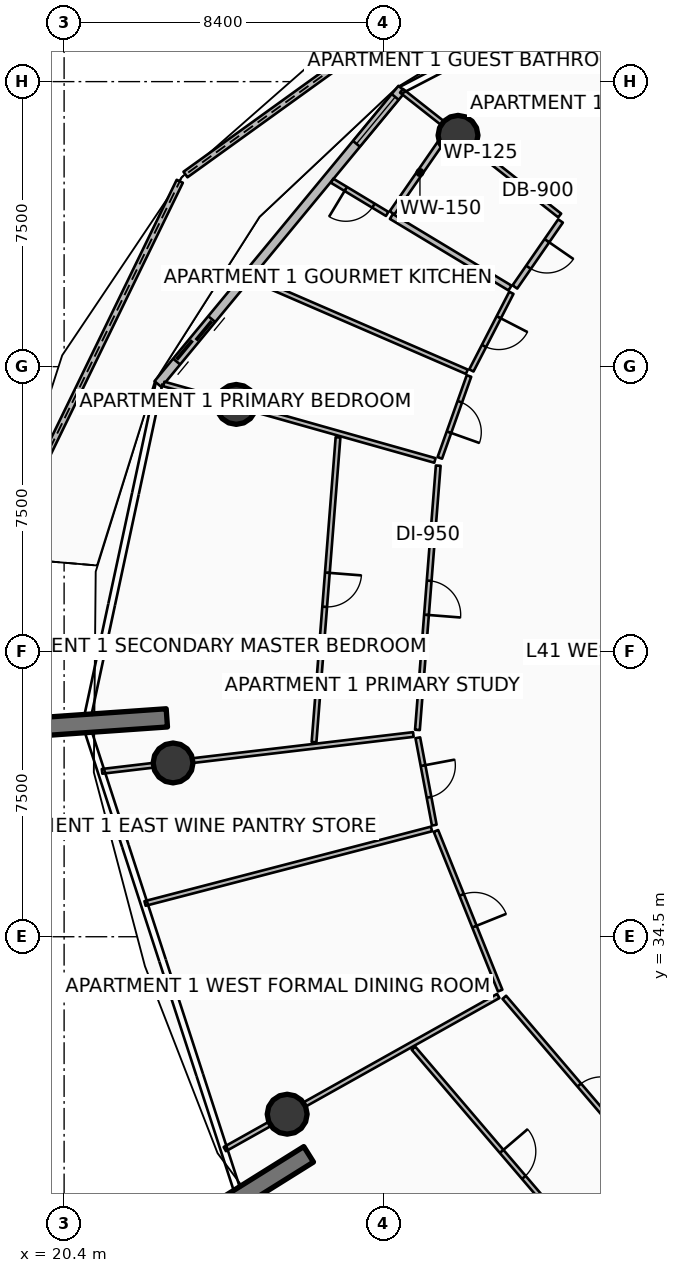
"""IFC4 building model, lengths in metres.
Left out: names, types, materials, properties, quantities, classifications, styles, units other than length and angle.
Written with IfcOpenShell. Run it as: python <this file> out.ifc"""

import sys

from ifc_helpers import new_model, si_unit, direction, frame, frame_2d, origin, origin_2d, place, context, subcontext, project, spatial, polyline, rectangle, circle, outline, extrude, element, fill, save


model = new_model("IFC4")
c1 = context("Model", 3, precision=1e-05, world=origin(), true_north=direction((0.0, 1.0)))
c2 = subcontext(c1, "Body", "Model", "MODEL_VIEW")
j1 = project(units=[si_unit("LENGTHUNIT", "METRE"), si_unit("PLANEANGLEUNIT", "RADIAN")], contexts=[c1])
p1 = place(None, origin())
s1 = spatial("IfcSite", under=j1, at=p1, CompositionType="ELEMENT")
p2 = place(p1, origin())
s2 = spatial("IfcBuilding", under=s1, at=p2, CompositionType="ELEMENT")
p3 = place(p2, frame((0.0, 0.0, 165.3)))
s3 = spatial("IfcBuildingStorey", under=s2, at=p3, CompositionType="ELEMENT", Elevation=165.3)
for number, where, z_axis, x_axis in (
    (1, (23.103, 40.259, 0.0), (0.0, 0.0, 1.0), (-0.998, -0.07, 0.0)),
    (2, (26.835, 28.774, 0.0), (0.0, 0.0, 1.0), (-0.848, -0.53, 0.0)),
):
    element("IfcWall", number, at=place(p3, frame(where, z_axis=z_axis, x_axis=x_axis)), inside=s3, PredefinedType="SOLIDWALL", context=c2, shape_type="SweptSolid", body=[
        extrude(rectangle(XDim=3.5, YDim=0.48, at=frame_2d((1.75, 0.0))), origin(), (0.0, 0.0, 1.0), 3.75),
    ])
for number, where, z_axis, x_axis in (
    (3, (30.766, 55.586, 0.0), (0.0, 0.0, 1.0), (1.0, 0.0, 0.0)),
    (4, (24.93, 48.506, 0.0), (0.0, 0.0, 1.0), (1.0, 0.0, 0.0)),
    (5, (23.267, 39.073, 0.0), (0.0, 0.0, 1.0), (1.0, 0.0, 0.0)),
    (6, (26.27, 29.831, 0.0), (0.0, 0.0, 1.0), (1.0, 0.0, 0.0)),
):
    element("IfcColumn", number, at=place(p3, frame(where, z_axis=z_axis, x_axis=x_axis)), inside=s3, PredefinedType="COLUMN", context=c2, shape_type="SweptSolid", body=[
        extrude(circle(Radius=0.525, at=origin_2d()), origin(), (0.0, 0.0, 1.0), 3.5),
    ])
p4 = place(p3, frame((31.942, 60.57, 0.0), z_axis=(0.0, 0.0, 1.0), x_axis=(-0.811363748486, -0.584541587608, 0.0)))
e7 = element("IfcWall", 7, at=p4, inside=s3, PredefinedType="PARAPET", context=c2, shape_type="SweptSolid", body=[
    extrude(outline(polyline([(0.0, 0.0), (10.29, 0.0), (10.29, 1.632), (5.145, 1.418), (0.0, 1.233), (0.0, 0.0)])), frame((0.0, 0.09, 0.0), z_axis=(0.0, -1.0, 0.0), x_axis=(1.0, 0.0, 0.0)), (0.0, 0.0, 1.0), 0.18),
])
p5 = place(p3, frame((23.444, 54.377, 0.0), z_axis=(0.0, 0.0, 1.0), x_axis=(-0.437208925246, -0.899359970026, 0.0)))
e8 = element("IfcWall", 8, at=p5, inside=s3, PredefinedType="PARAPET", context=c2, shape_type="SweptSolid", body=[
    extrude(outline(polyline([(0.0, 0.0), (10.992, 0.0), (10.992, 1.86), (5.496, 1.798), (0.0, 1.632), (0.0, 0.0)])), frame((0.0, 0.09, 0.0), z_axis=(0.0, -1.0, 0.0), x_axis=(1.0, 0.0, 0.0)), (0.0, 0.0, 1.0), 0.18),
])
p6 = place(p3, frame((29.291, 56.813, 0.0), z_axis=(0.0, 0.0, 1.0), x_axis=(-0.636771922292, -0.77105221547, 0.0)))
e9 = element("IfcWall", 9, at=p6, inside=s3, PredefinedType="SOLIDWALL", context=c2, shape_type="SweptSolid", body=[
    extrude(rectangle(XDim=10.082, YDim=0.24, at=frame_2d((5.041, 0.0))), origin(), (0.0, 0.0, 1.0), 2.45),
])
p7 = place(p6, frame((7.862, 0.0, 0.0)))
e10 = element("IfcOpeningElement", 10, at=p7, cuts=e9, PredefinedType="OPENING", context=c2, shape_type="SweptSolid", body=[
    extrude(rectangle(XDim=1.45, YDim=2.15, at=frame_2d((0.725, 1.075))), frame((0.0, 0.13, 0.0), z_axis=(0.0, -1.0, 0.0), x_axis=(1.0, 0.0, 0.0)), (0.0, 0.0, 1.0), 0.26),
])
p8 = place(p6, frame((0.28, 0.0, 0.65)))
e11 = element("IfcOpeningElement", 11, at=p8, cuts=e9, PredefinedType="OPENING", context=c2, shape_type="SweptSolid", body=[
    extrude(rectangle(XDim=1.6, YDim=1.5, at=frame_2d((0.8, 0.75))), frame((0.0, 0.13, 0.0), z_axis=(0.0, -1.0, 0.0), x_axis=(1.0, 0.0, 0.0)), (0.0, 0.0, 1.0), 0.26),
])
p9 = place(p3, frame((33.441, 53.477, 0.0), z_axis=(0.0, 0.0, 1.0), x_axis=(-0.785319981095, 0.619090080112, 0.0)))
e12 = element("IfcWall", 12, at=p9, inside=s3, PredefinedType="PARTITIONING", context=c2, shape_type="SweptSolid", body=[
    extrude(rectangle(XDim=5.301, YDim=0.125, at=frame_2d((2.65, 0.0))), origin(), (0.0, 0.0, 1.0), 2.94),
])
p10 = place(p3, frame((33.463, 53.333, 0.0), z_axis=(0.0, 0.0, 1.0), x_axis=(-0.568843105688, -0.822446059697, 0.0)))
e13 = element("IfcWall", 13, at=p10, inside=s3, PredefinedType="PARTITIONING", context=c2, shape_type="SweptSolid", body=[
    extrude(rectangle(XDim=2.111, YDim=0.15, at=frame_2d((1.056, 0.0))), origin(), (0.0, 0.0, 1.0), 2.94),
])
p11 = place(p10, frame((0.631, 0.0, 0.0)))
e14 = element("IfcOpeningElement", 14, at=p11, cuts=e13, PredefinedType="OPENING", context=c2, shape_type="SweptSolid", body=[
    extrude(rectangle(XDim=0.85, YDim=2.06, at=frame_2d((0.425, 1.03))), frame((0.0, 0.085, 0.0), z_axis=(0.0, -1.0, 0.0), x_axis=(1.0, 0.0, 0.0)), (0.0, 0.0, 1.0), 0.17),
])
p12 = place(p3, frame((30.498, 55.67, 0.0), z_axis=(0.0, 0.0, 1.0), x_axis=(-0.56886579211, -0.822430368218, 0.0)))
e15 = element("IfcWall", 15, at=p12, inside=s3, PredefinedType="PARTITIONING", context=c2, shape_type="SweptSolid", body=[
    extrude(rectangle(XDim=2.582, YDim=0.15, at=frame_2d((1.291, 0.0))), origin(), (0.0, 0.0, 1.0), 2.94),
])
p13 = place(p3, frame((32.133, 51.57, 0.0), z_axis=(0.0, 0.0, 1.0), x_axis=(-0.856320461768, 0.516444834186, 0.0)))
e16 = element("IfcWall", 16, at=p13, inside=s3, PredefinedType="PARTITIONING", context=c2, shape_type="SweptSolid", body=[
    extrude(rectangle(XDim=3.645, YDim=0.15, at=frame_2d((1.822, 0.0))), origin(), (0.0, 0.0, 1.0), 2.94),
])
p14 = place(p3, frame((28.901, 53.519, 0.0), z_axis=(0.0, 0.0, 1.0), x_axis=(-0.856306503803, 0.516467977269, 0.0)))
e17 = element("IfcWall", 17, at=p14, inside=s3, PredefinedType="PARTITIONING", context=c2, shape_type="SweptSolid", body=[
    extrude(rectangle(XDim=1.692, YDim=0.125, at=frame_2d((0.846, 0.0))), origin(), (0.0, 0.0, 1.0), 2.94),
])
p15 = place(p14, frame((0.421, 0.0, 0.0)))
e18 = element("IfcOpeningElement", 18, at=p15, cuts=e17, PredefinedType="OPENING", context=c2, shape_type="SweptSolid", body=[
    extrude(rectangle(XDim=0.85, YDim=2.06, at=frame_2d((0.425, 1.03))), frame((0.0, 0.073, 0.0), z_axis=(0.0, -1.0, 0.0), x_axis=(1.0, 0.0, 0.0)), (0.0, 0.0, 1.0), 0.145),
])
p16 = place(p3, frame((30.998, 49.365, 0.0), z_axis=(0.0, 0.0, 1.0), x_axis=(-0.917591640713, 0.397524314845, 0.0)))
e19 = element("IfcWall", 19, at=p16, inside=s3, PredefinedType="PARTITIONING", context=c2, shape_type="SweptSolid", body=[
    extrude(rectangle(XDim=6.182, YDim=0.125, at=frame_2d((3.091, 0.0))), origin(), (0.0, 0.0, 1.0), 2.94),
])
p17 = place(p3, frame((32.169, 51.443, 0.0), z_axis=(0.0, 0.0, 1.0), x_axis=(-0.458020211203, -0.888941778819, 0.0)))
e20 = element("IfcWall", 20, at=p17, inside=s3, PredefinedType="PARTITIONING", context=c2, shape_type="SweptSolid", body=[
    extrude(rectangle(XDim=2.297, YDim=0.125, at=frame_2d((1.149, 0.0))), origin(), (0.0, 0.0, 1.0), 2.94),
])
p18 = place(p17, frame((0.724, 0.0, 0.0)))
e21 = element("IfcOpeningElement", 21, at=p18, cuts=e20, PredefinedType="OPENING", context=c2, shape_type="SweptSolid", body=[
    extrude(rectangle(XDim=0.85, YDim=2.06, at=frame_2d((0.425, 1.03))), frame((0.0, 0.073, 0.0), z_axis=(0.0, -1.0, 0.0), x_axis=(1.0, 0.0, 0.0)), (0.0, 0.0, 1.0), 0.145),
])
p19 = place(p3, frame((31.054, 49.254, 0.0), z_axis=(0.0, 0.0, 1.0), x_axis=(-0.335247594753, -0.942130060136, 0.0)))
e22 = element("IfcWall", 22, at=p19, inside=s3, PredefinedType="PARTITIONING", context=c2, shape_type="SweptSolid", body=[
    extrude(rectangle(XDim=2.287, YDim=0.125, at=frame_2d((1.144, 0.0))), origin(), (0.0, 0.0, 1.0), 2.94),
])
p20 = place(p19, frame((0.719, 0.0, 0.0)))
e23 = element("IfcOpeningElement", 23, at=p20, cuts=e22, PredefinedType="OPENING", context=c2, shape_type="SweptSolid", body=[
    extrude(rectangle(XDim=0.85, YDim=2.06, at=frame_2d((0.425, 1.03))), frame((0.0, 0.073, 0.0), z_axis=(0.0, -1.0, 0.0), x_axis=(1.0, 0.0, 0.0)), (0.0, 0.0, 1.0), 0.145),
])
p21 = place(p3, frame((30.157, 47.032, 0.0), z_axis=(0.0, 0.0, 1.0), x_axis=(-0.962456736489, 0.271435131084, 0.0)))
e24 = element("IfcWall", 24, at=p21, inside=s3, PredefinedType="PARTITIONING", context=c2, shape_type="SweptSolid", body=[
    extrude(rectangle(XDim=7.412, YDim=0.125, at=frame_2d((3.706, 0.0))), origin(), (0.0, 0.0, 1.0), 2.94),
])
p22 = place(p3, frame((30.245, 46.896, 0.0), z_axis=(0.0, 0.0, 1.0), x_axis=(-0.078444324085, -0.996918496177, 0.0)))
e25 = element("IfcWall", 25, at=p22, inside=s3, PredefinedType="PARTITIONING", context=c2, shape_type="SweptSolid", body=[
    extrude(rectangle(XDim=6.975, YDim=0.125, at=frame_2d((3.487, 0.0))), origin(), (0.0, 0.0, 1.0), 2.94),
])
p23 = place(p22, frame((3.037, 0.0, 0.0)))
e26 = element("IfcOpeningElement", 26, at=p23, cuts=e25, PredefinedType="OPENING", context=c2, shape_type="SweptSolid", body=[
    extrude(rectangle(XDim=0.9, YDim=2.08, at=frame_2d((0.45, 1.04))), frame((0.0, 0.073, 0.0), z_axis=(0.0, -1.0, 0.0), x_axis=(1.0, 0.0, 0.0)), (0.0, 0.0, 1.0), 0.145),
])
p24 = place(p3, frame((27.608, 47.639, 0.0), z_axis=(0.0, 0.0, 1.0), x_axis=(-0.078490541144, -0.996914858426, 0.0)))
e27 = element("IfcWall", 27, at=p24, inside=s3, PredefinedType="PARTITIONING", context=c2, shape_type="SweptSolid", body=[
    extrude(rectangle(XDim=8.044, YDim=0.125, at=frame_2d((4.022, 0.0))), origin(), (0.0, 0.0, 1.0), 2.94),
])
p25 = place(p24, frame((3.572, 0.0, 0.0)))
e28 = element("IfcOpeningElement", 28, at=p25, cuts=e27, PredefinedType="OPENING", context=c2, shape_type="SweptSolid", body=[
    extrude(rectangle(XDim=0.9, YDim=2.08, at=frame_2d((0.45, 1.04))), frame((0.0, 0.073, 0.0), z_axis=(0.0, -1.0, 0.0), x_axis=(1.0, 0.0, 0.0)), (0.0, 0.0, 1.0), 0.145),
])
p26 = place(p3, frame((29.59, 39.821, 0.0), z_axis=(0.0, 0.0, 1.0), x_axis=(-0.993070354128, -0.117521367213, 0.0)))
e29 = element("IfcWall", 29, at=p26, inside=s3, PredefinedType="PARTITIONING", context=c2, shape_type="SweptSolid", body=[
    extrude(rectangle(XDim=8.247, YDim=0.125, at=frame_2d((4.124, 0.0))), origin(), (0.0, 0.0, 1.0), 2.94),
])
p27 = place(p3, frame((30.068, 37.336, 0.0), z_axis=(0.0, 0.0, 1.0), x_axis=(-0.967797769308, -0.251728976723, 0.0)))
e30 = element("IfcWall", 30, at=p27, inside=s3, PredefinedType="PARTITIONING", context=c2, shape_type="SweptSolid", body=[
    extrude(rectangle(XDim=7.789, YDim=0.125, at=frame_2d((3.895, 0.0))), origin(), (0.0, 0.0, 1.0), 2.94),
])
p28 = place(p3, frame((29.707, 39.734, 0.0), z_axis=(0.0, 0.0, 1.0), x_axis=(0.185057746292, -0.9827276482, 0.0)))
e31 = element("IfcWall", 31, at=p28, inside=s3, PredefinedType="PARTITIONING", context=c2, shape_type="SweptSolid", body=[
    extrude(rectangle(XDim=2.338, YDim=0.125, at=frame_2d((1.169, 0.0))), origin(), (0.0, 0.0, 1.0), 2.94),
])
p29 = place(p28, frame((0.744, 0.0, 0.0)))
e32 = element("IfcOpeningElement", 32, at=p29, cuts=e31, PredefinedType="OPENING", context=c2, shape_type="SweptSolid", body=[
    extrude(rectangle(XDim=0.85, YDim=2.06, at=frame_2d((0.425, 1.03))), frame((0.0, 0.073, 0.0), z_axis=(0.0, -1.0, 0.0), x_axis=(1.0, 0.0, 0.0)), (0.0, 0.0, 1.0), 0.145),
])
p30 = place(p3, frame((30.185, 37.284, 0.0), z_axis=(0.0, 0.0, 1.0), x_axis=(0.373193309098, -0.927753606322, 0.0)))
e33 = element("IfcWall", 33, at=p30, inside=s3, PredefinedType="PARTITIONING", context=c2, shape_type="SweptSolid", body=[
    extrude(rectangle(XDim=4.528, YDim=0.125, at=frame_2d((2.264, 0.0))), origin(), (0.0, 0.0, 1.0), 2.94),
])
p31 = place(p30, frame((1.814, 0.0, 0.0)))
e34 = element("IfcOpeningElement", 34, at=p31, cuts=e33, PredefinedType="OPENING", context=c2, shape_type="SweptSolid", body=[
    extrude(rectangle(XDim=0.9, YDim=2.08, at=frame_2d((0.45, 1.04))), frame((0.0, 0.073, 0.0), z_axis=(0.0, -1.0, 0.0), x_axis=(1.0, 0.0, 0.0)), (0.0, 0.0, 1.0), 0.145),
])
p32 = place(p3, frame((31.825, 32.941, 0.0), z_axis=(0.0, 0.0, 1.0), x_axis=(-0.872491881101, -0.488628608877, 0.0)))
e35 = element("IfcWall", 35, at=p32, inside=s3, PredefinedType="PARTITIONING", context=c2, shape_type="SweptSolid", body=[
    extrude(rectangle(XDim=8.247, YDim=0.125, at=frame_2d((4.124, 0.0))), origin(), (0.0, 0.0, 1.0), 2.94),
])
p33 = place(p3, frame((31.983, 32.907, 0.0), z_axis=(0.0, 0.0, 1.0), x_axis=(0.649447060425, -0.76040680935, 0.0)))
e36 = element("IfcWall", 36, at=p33, inside=s3, PredefinedType="PARTITIONING", context=c2, shape_type="SweptSolid", body=[
    extrude(rectangle(XDim=6.975, YDim=0.125, at=frame_2d((3.487, 0.0))), origin(), (0.0, 0.0, 1.0), 2.94),
])
p34 = place(p33, frame((3.037, 0.0, 0.0)))
e37 = element("IfcOpeningElement", 37, at=p34, cuts=e36, PredefinedType="OPENING", context=c2, shape_type="SweptSolid", body=[
    extrude(rectangle(XDim=0.9, YDim=2.08, at=frame_2d((0.45, 1.04))), frame((0.0, 0.073, 0.0), z_axis=(0.0, -1.0, 0.0), x_axis=(1.0, 0.0, 0.0)), (0.0, 0.0, 1.0), 0.145),
])
p35 = place(p3, frame((29.593, 31.568, 0.0), z_axis=(0.0, 0.0, 1.0), x_axis=(0.649460624158, -0.760395224649, 0.0)))
e38 = element("IfcWall", 38, at=p35, inside=s3, PredefinedType="PARTITIONING", context=c2, shape_type="SweptSolid", body=[
    extrude(rectangle(XDim=8.044, YDim=0.125, at=frame_2d((4.022, 0.0))), origin(), (0.0, 0.0, 1.0), 2.94),
])
p36 = place(p35, frame((3.572, 0.0, 0.0)))
e39 = element("IfcOpeningElement", 39, at=p36, cuts=e38, PredefinedType="OPENING", context=c2, shape_type="SweptSolid", body=[
    extrude(rectangle(XDim=0.9, YDim=2.08, at=frame_2d((0.45, 1.04))), frame((0.0, 0.073, 0.0), z_axis=(0.0, -1.0, 0.0), x_axis=(1.0, 0.0, 0.0)), (0.0, 0.0, 1.0), 0.145),
])
p37 = place(p7, origin())
e40 = element("IfcDoor", 40, at=p37, inside=s3, OperationType="DOUBLE_DOOR_SLIDING", PredefinedType="DOOR", context=c2, shape_type="SweptSolid", body=[
    extrude(rectangle(XDim=1.45, YDim=2.15, at=frame_2d((0.725, 1.075))), frame((0.0, 0.025, 0.0), z_axis=(0.0, -1.0, 0.0), x_axis=(1.0, 0.0, 0.0)), (0.0, 0.0, 1.0), 0.05),
])
fill(e10, e40)
p38 = place(p8, origin())
e41 = element("IfcWindow", 41, at=p38, inside=s3, PartitioningType="SINGLE_PANEL", PredefinedType="WINDOW", context=c2, shape_type="SweptSolid", body=[
    extrude(rectangle(XDim=1.6, YDim=1.5, at=frame_2d((0.8, 0.75))), frame((0.0, 0.03, 0.0), z_axis=(0.0, -1.0, 0.0), x_axis=(1.0, 0.0, 0.0)), (0.0, 0.0, 1.0), 0.06),
])
fill(e11, e41)
p39 = place(p11, origin())
e42 = element("IfcDoor", 42, at=p39, inside=s3, OperationType="SINGLE_SWING_LEFT", PredefinedType="DOOR", context=c2, shape_type="SweptSolid", body=[
    extrude(rectangle(XDim=0.85, YDim=2.06, at=frame_2d((0.425, 1.03))), frame((0.0, 0.025, 0.0), z_axis=(0.0, -1.0, 0.0), x_axis=(1.0, 0.0, 0.0)), (0.0, 0.0, 1.0), 0.05),
])
fill(e14, e42)
p40 = place(p15, origin())
e43 = element("IfcDoor", 43, at=p40, inside=s3, OperationType="SINGLE_SWING_RIGHT", PredefinedType="DOOR", context=c2, shape_type="SweptSolid", body=[
    extrude(rectangle(XDim=0.85, YDim=2.06, at=frame_2d((0.425, 1.03))), frame((0.0, 0.025, 0.0), z_axis=(0.0, -1.0, 0.0), x_axis=(1.0, 0.0, 0.0)), (0.0, 0.0, 1.0), 0.05),
])
fill(e18, e43)
p41 = place(p18, origin())
e44 = element("IfcDoor", 44, at=p41, inside=s3, OperationType="SINGLE_SWING_LEFT", PredefinedType="DOOR", context=c2, shape_type="SweptSolid", body=[
    extrude(rectangle(XDim=0.85, YDim=2.06, at=frame_2d((0.425, 1.03))), frame((0.0, 0.025, 0.0), z_axis=(0.0, -1.0, 0.0), x_axis=(1.0, 0.0, 0.0)), (0.0, 0.0, 1.0), 0.05),
])
fill(e21, e44)
p42 = place(p20, origin())
e45 = element("IfcDoor", 45, at=p42, inside=s3, OperationType="SINGLE_SWING_RIGHT", PredefinedType="DOOR", context=c2, shape_type="SweptSolid", body=[
    extrude(rectangle(XDim=0.85, YDim=2.06, at=frame_2d((0.425, 1.03))), frame((0.0, 0.025, 0.0), z_axis=(0.0, -1.0, 0.0), x_axis=(1.0, 0.0, 0.0)), (0.0, 0.0, 1.0), 0.05),
])
fill(e23, e45)
p43 = place(p23, origin())
e46 = element("IfcDoor", 46, at=p43, inside=s3, OperationType="SINGLE_SWING_RIGHT", PredefinedType="DOOR", context=c2, shape_type="SweptSolid", body=[
    extrude(rectangle(XDim=0.9, YDim=2.08, at=frame_2d((0.45, 1.04))), frame((0.0, 0.025, 0.0), z_axis=(0.0, -1.0, 0.0), x_axis=(1.0, 0.0, 0.0)), (0.0, 0.0, 1.0), 0.05),
])
fill(e26, e46)
p44 = place(p25, origin())
e47 = element("IfcDoor", 47, at=p44, inside=s3, OperationType="SINGLE_SWING_LEFT", PredefinedType="DOOR", context=c2, shape_type="SweptSolid", body=[
    extrude(rectangle(XDim=0.9, YDim=2.08, at=frame_2d((0.45, 1.04))), frame((0.0, 0.025, 0.0), z_axis=(0.0, -1.0, 0.0), x_axis=(1.0, 0.0, 0.0)), (0.0, 0.0, 1.0), 0.05),
])
fill(e28, e47)
p45 = place(p29, origin())
e48 = element("IfcDoor", 48, at=p45, inside=s3, OperationType="SINGLE_SWING_LEFT", PredefinedType="DOOR", context=c2, shape_type="SweptSolid", body=[
    extrude(rectangle(XDim=0.85, YDim=2.06, at=frame_2d((0.425, 1.03))), frame((0.0, 0.025, 0.0), z_axis=(0.0, -1.0, 0.0), x_axis=(1.0, 0.0, 0.0)), (0.0, 0.0, 1.0), 0.05),
])
fill(e32, e48)
p46 = place(p31, origin())
e49 = element("IfcDoor", 49, at=p46, inside=s3, OperationType="SINGLE_SWING_RIGHT", PredefinedType="DOOR", context=c2, shape_type="SweptSolid", body=[
    extrude(rectangle(XDim=0.9, YDim=2.08, at=frame_2d((0.45, 1.04))), frame((0.0, 0.025, 0.0), z_axis=(0.0, -1.0, 0.0), x_axis=(1.0, 0.0, 0.0)), (0.0, 0.0, 1.0), 0.05),
])
fill(e34, e49)
p47 = place(p34, origin())
e50 = element("IfcDoor", 50, at=p47, inside=s3, OperationType="SINGLE_SWING_RIGHT", PredefinedType="DOOR", context=c2, shape_type="SweptSolid", body=[
    extrude(rectangle(XDim=0.9, YDim=2.08, at=frame_2d((0.45, 1.04))), frame((0.0, 0.025, 0.0), z_axis=(0.0, -1.0, 0.0), x_axis=(1.0, 0.0, 0.0)), (0.0, 0.0, 1.0), 0.05),
])
fill(e37, e50)
p48 = place(p36, origin())
e51 = element("IfcDoor", 51, at=p48, inside=s3, OperationType="SINGLE_SWING_LEFT", PredefinedType="DOOR", context=c2, shape_type="SweptSolid", body=[
    extrude(rectangle(XDim=0.9, YDim=2.08, at=frame_2d((0.45, 1.04))), frame((0.0, 0.025, 0.0), z_axis=(0.0, -1.0, 0.0), x_axis=(1.0, 0.0, 0.0)), (0.0, 0.0, 1.0), 0.05),
])
fill(e39, e51)
save(model, sys.argv[1])
